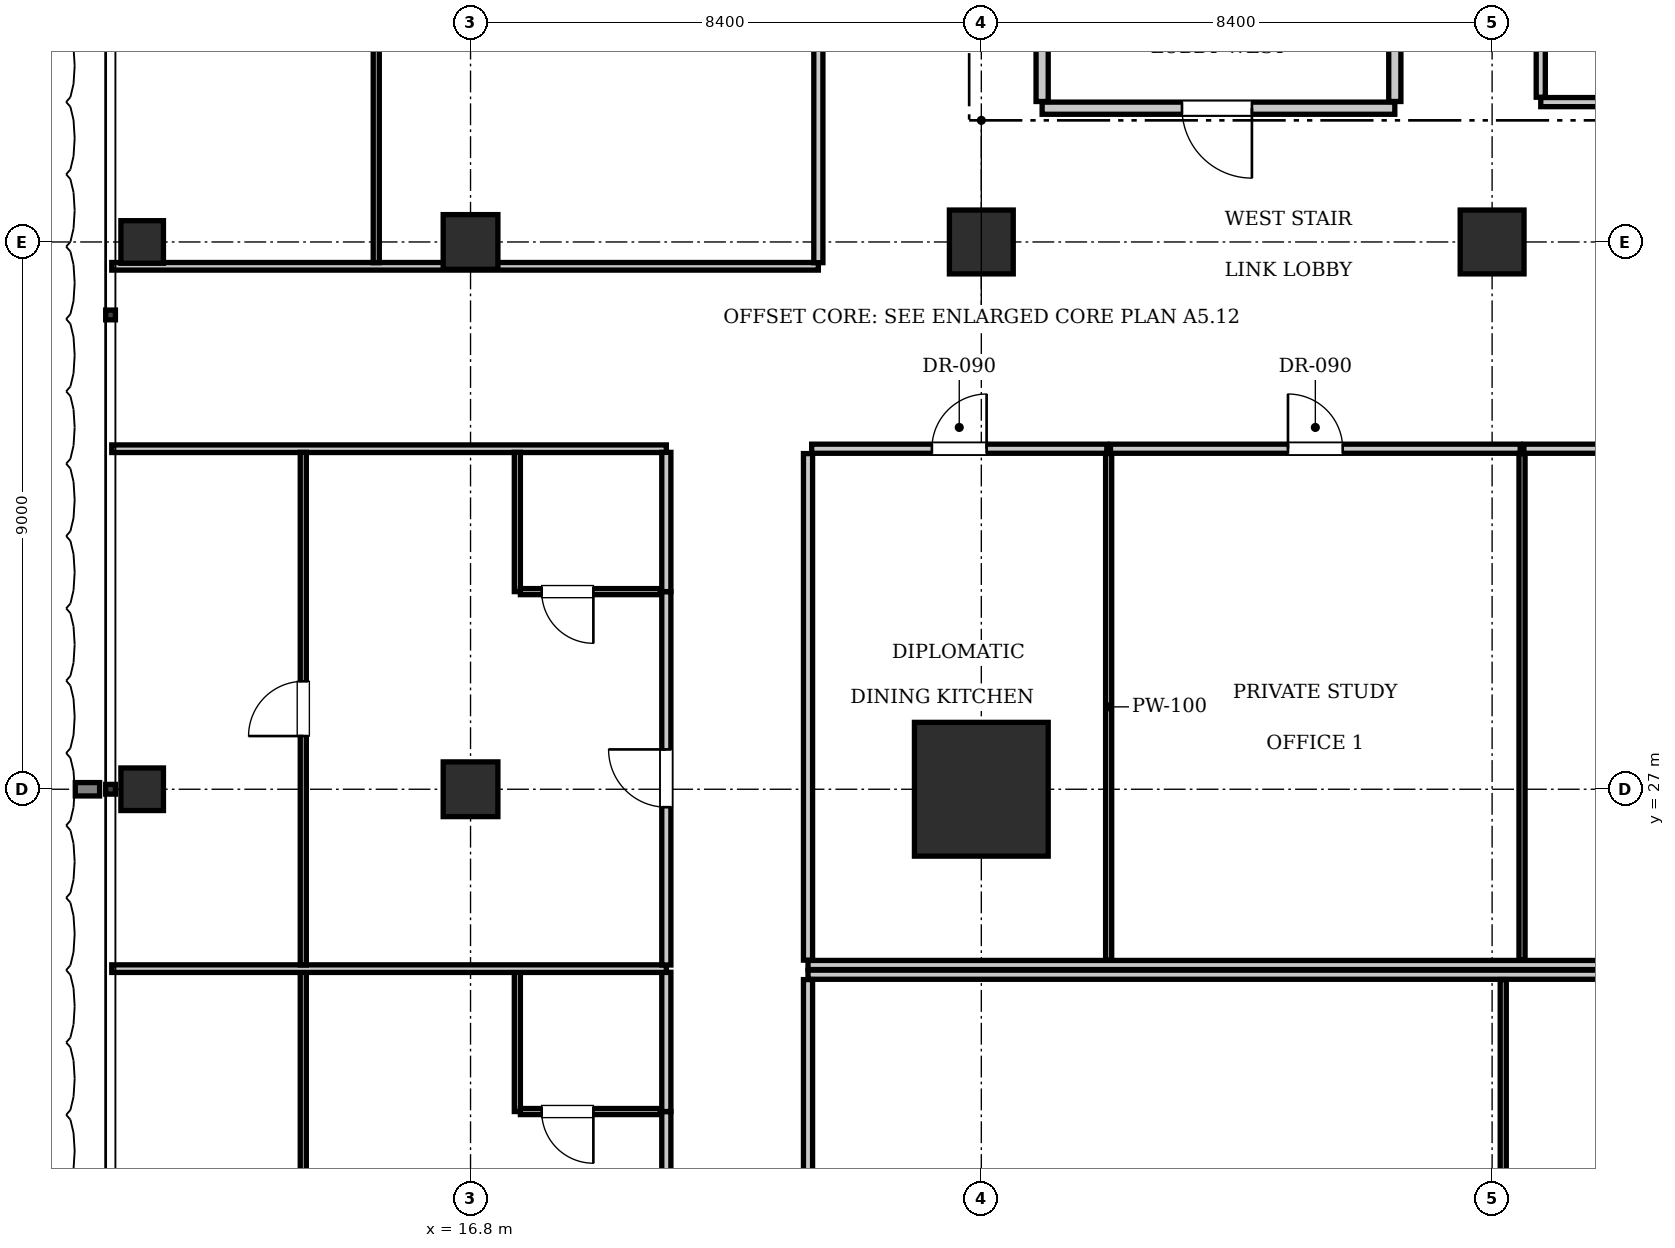
"""IFC4 building model, lengths in metres.
Left out: names, types, materials, properties, quantities, classifications, styles, units other than length and angle.
Written with IfcOpenShell. Run it as: python <this file> out.ifc"""

import sys

from ifc_helpers import new_model, si_unit, direction, frame, frame_2d, origin, origin_2d, place, context, subcontext, project, spatial, rectangle, i_section, extrude, element, fill, save


model = new_model("IFC4")
c1 = context("Model", 3, precision=1e-05, world=origin(), true_north=direction((0.0, 1.0)))
c2 = subcontext(c1, "Body", "Model", "MODEL_VIEW")
j1 = project(units=[si_unit("LENGTHUNIT", "METRE"), si_unit("PLANEANGLEUNIT", "RADIAN")], contexts=[c1])
p1 = place(None, origin())
s1 = spatial("IfcSite", under=j1, at=p1, CompositionType="ELEMENT")
p2 = place(p1, origin())
s2 = spatial("IfcBuilding", under=s1, at=p2, CompositionType="ELEMENT")
p3 = place(p2, frame((0.0, 0.0, 65.45)))
s3 = spatial("IfcBuildingStorey", under=s2, at=p3, CompositionType="ELEMENT", Elevation=65.45)
p4 = place(p3, frame((25.2, 27.0, 0.0), z_axis=(0.0, 0.0, 1.0), x_axis=(1.0, 0.0, 0.0)))
e1 = element("IfcColumn", 1, at=p4, inside=s3, PredefinedType="COLUMN", context=c2, shape_type="SweptSolid", body=[
    extrude(rectangle(XDim=2.2, YDim=2.2, at=origin_2d()), origin(), (0.0, 0.0, 1.0), 3.85),
])
for number, where, z_axis, x_axis in (
    (2, (25.2, 36.0, 0.0), (0.0, 0.0, 1.0), (1.0, 0.0, 0.0)),
    (3, (33.6, 36.0, 0.0), (0.0, 0.0, 1.0), (1.0, 0.0, 0.0)),
):
    element("IfcColumn", number, at=place(p3, frame(where, z_axis=z_axis, x_axis=x_axis)), inside=s3, PredefinedType="COLUMN", context=c2, shape_type="SweptSolid", body=[
        extrude(rectangle(XDim=1.05, YDim=1.05, at=origin_2d()), origin(), (0.0, 0.0, 1.0), 3.85),
    ])
for number, where, z_axis, x_axis in (
    (4, (16.8, 27.0, 0.0), (0.0, 0.0, 1.0), (1.0, 0.0, 0.0)),
    (5, (16.8, 36.0, 0.0), (0.0, 0.0, 1.0), (1.0, 0.0, 0.0)),
):
    element("IfcColumn", number, at=place(p3, frame(where, z_axis=z_axis, x_axis=x_axis)), inside=s3, PredefinedType="COLUMN", context=c2, shape_type="SweptSolid", body=[
        extrude(rectangle(XDim=0.9, YDim=0.9, at=origin_2d()), origin(), (0.0, 0.0, 1.0), 3.85),
    ])
for number, where, z_axis, x_axis in (
    (6, (11.4, 27.0, 0.0), (0.0, 0.0, 1.0), (1.0, 0.0, 0.0)),
    (7, (11.4, 36.0, 0.0), (0.0, 0.0, 1.0), (1.0, 0.0, 0.0)),
):
    element("IfcColumn", number, at=place(p3, frame(where, z_axis=z_axis, x_axis=x_axis)), inside=s3, PredefinedType="COLUMN", context=c2, shape_type="SweptSolid", body=[
        extrude(i_section(OverallWidth=0.7, OverallDepth=0.7, WebThickness=0.028, FlangeThickness=0.044, at=origin_2d()), origin(), (0.0, 0.0, 1.0), 3.85),
    ])
p5 = place(p3, frame((26.2, 38.2, 0.0), z_axis=(0.0, 0.0, 1.0), x_axis=(1.0, 0.0, 0.0)))
e8 = element("IfcWall", 8, at=p5, inside=s3, PredefinedType="PARTITIONING", context=c2, shape_type="SweptSolid", body=[
    extrude(rectangle(XDim=5.8, YDim=0.2, at=frame_2d((2.9, 0.0))), origin(), (0.0, 0.0, 1.0), 3.61),
])
p6 = place(p5, frame((2.3, 0.0, 0.0)))
e9 = element("IfcOpeningElement", 9, at=p6, cuts=e8, PredefinedType="OPENING", context=c2, shape_type="SweptSolid", body=[
    extrude(rectangle(XDim=1.15, YDim=2.15, at=frame_2d((0.575, 1.075))), frame((0.0, 0.11, 0.0), z_axis=(0.0, -1.0, 0.0), x_axis=(1.0, 0.0, 0.0)), (0.0, 0.0, 1.0), 0.22),
])
for number, where, z_axis, x_axis in (
    (10, (26.2, 38.31, 0.0), (0.0, 0.0, 1.0), (0.0, 1.0, 0.0)),
    (11, (32.0, 38.31, 0.0), (0.0, 0.0, 1.0), (0.0, 1.0, 0.0)),
):
    element("IfcWall", number, at=place(p3, frame(where, z_axis=z_axis, x_axis=x_axis)), inside=s3, PredefinedType="PARTITIONING", context=c2, shape_type="SweptSolid", body=[
        extrude(rectangle(XDim=3.07, YDim=0.2, at=frame_2d((1.535, 0.0))), origin(), (0.0, 0.0, 1.0), 3.61),
    ])
p7 = place(p3, frame((34.4, 38.3, 0.0), z_axis=(0.0, 0.0, 1.0), x_axis=(1.0, 0.0, 0.0)))
e12 = element("IfcWall", 12, at=p7, inside=s3, PredefinedType="PARTITIONING", context=c2, shape_type="SweptSolid", body=[
    extrude(rectangle(XDim=5.92, YDim=0.15, at=frame_2d((2.96, 0.0))), origin(), (0.0, 0.0, 1.0), 3.61),
])
p8 = place(p7, frame((2.4, 0.0, 0.0)))
e13 = element("IfcOpeningElement", 13, at=p8, cuts=e12, PredefinedType="OPENING", context=c2, shape_type="SweptSolid", body=[
    extrude(rectangle(XDim=0.9, YDim=2.1, at=frame_2d((0.45, 1.05))), frame((0.0, 0.085, 0.0), z_axis=(0.0, -1.0, 0.0), x_axis=(1.0, 0.0, 0.0)), (0.0, 0.0, 1.0), 0.17),
])
p9 = place(p3, frame((34.4, 38.38, 0.0), z_axis=(0.0, 0.0, 1.0), x_axis=(0.0, 1.0, 0.0)))
e14 = element("IfcWall", 14, at=p9, inside=s3, PredefinedType="PARTITIONING", context=c2, shape_type="SweptSolid", body=[
    extrude(rectangle(XDim=2.84, YDim=0.15, at=frame_2d((1.42, 0.0))), origin(), (0.0, 0.0, 1.0), 3.61),
])
p10 = place(p3, frame((22.35, 24.11, 0.0), z_axis=(0.0, 0.0, 1.0), x_axis=(1.0, 0.0, 0.0)))
e15 = element("IfcWall", 15, at=p10, inside=s3, PredefinedType="PARTITIONING", context=c2, shape_type="SweptSolid", body=[
    extrude(rectangle(XDim=30.9, YDim=0.15, at=frame_2d((15.45, 0.0))), origin(), (0.0, 0.0, 1.0), 3.61),
])
p11 = place(p3, frame((22.35, 24.19, 0.0), z_axis=(0.0, 0.0, 1.0), x_axis=(0.0, 1.0, 0.0)))
e16 = element("IfcWall", 16, at=p11, inside=s3, PredefinedType="PARTITIONING", context=c2, shape_type="SweptSolid", body=[
    extrude(rectangle(XDim=8.33, YDim=0.15, at=frame_2d((4.165, 0.0))), origin(), (0.0, 0.0, 1.0), 3.61),
])
p12 = place(p3, frame((22.41, 32.6, 0.0), z_axis=(0.0, 0.0, 1.0), x_axis=(1.0, 0.0, 0.0)))
e17 = element("IfcWall", 17, at=p12, inside=s3, PredefinedType="PARTITIONING", context=c2, shape_type="SweptSolid", body=[
    extrude(rectangle(XDim=4.854, YDim=0.15, at=frame_2d((2.427, 0.0))), origin(), (0.0, 0.0, 1.0), 3.61),
])
p13 = place(p12, frame((1.977, 0.0, 0.0)))
e18 = element("IfcOpeningElement", 18, at=p13, cuts=e17, PredefinedType="OPENING", context=c2, shape_type="SweptSolid", body=[
    extrude(rectangle(XDim=0.9, YDim=2.1, at=frame_2d((0.45, 1.05))), frame((0.0, 0.085, 0.0), z_axis=(0.0, -1.0, 0.0), x_axis=(1.0, 0.0, 0.0)), (0.0, 0.0, 1.0), 0.17),
])
p14 = place(p3, frame((27.294, 24.19, 0.0), z_axis=(0.0, 0.0, 1.0), x_axis=(0.0, 1.0, 0.0)))
e19 = element("IfcWall", 19, at=p14, inside=s3, PredefinedType="PARTITIONING", context=c2, shape_type="SweptSolid", body=[
    extrude(rectangle(XDim=8.33, YDim=0.1, at=frame_2d((4.165, 0.0))), origin(), (0.0, 0.0, 1.0), 3.61),
])
p15 = place(p3, frame((27.324, 32.6, 0.0), z_axis=(0.0, 0.0, 1.0), x_axis=(1.0, 0.0, 0.0)))
e20 = element("IfcWall", 20, at=p15, inside=s3, PredefinedType="PARTITIONING", context=c2, shape_type="SweptSolid", body=[
    extrude(rectangle(XDim=6.738, YDim=0.15, at=frame_2d((3.369, 0.0))), origin(), (0.0, 0.0, 1.0), 3.61),
])
p16 = place(p15, frame((2.919, 0.0, 0.0)))
e21 = element("IfcOpeningElement", 21, at=p16, cuts=e20, PredefinedType="OPENING", context=c2, shape_type="SweptSolid", body=[
    extrude(rectangle(XDim=0.9, YDim=2.1, at=frame_2d((0.45, 1.05))), frame((0.0, 0.085, 0.0), z_axis=(0.0, -1.0, 0.0), x_axis=(1.0, 0.0, 0.0)), (0.0, 0.0, 1.0), 0.17),
])
p17 = place(p3, frame((34.092, 24.19, 0.0), z_axis=(0.0, 0.0, 1.0), x_axis=(0.0, 1.0, 0.0)))
e22 = element("IfcWall", 22, at=p17, inside=s3, PredefinedType="PARTITIONING", context=c2, shape_type="SweptSolid", body=[
    extrude(rectangle(XDim=8.33, YDim=0.1, at=frame_2d((4.165, 0.0))), origin(), (0.0, 0.0, 1.0), 3.61),
])
p18 = place(p3, frame((34.122, 32.6, 0.0), z_axis=(0.0, 0.0, 1.0), x_axis=(1.0, 0.0, 0.0)))
e23 = element("IfcWall", 23, at=p18, inside=s3, PredefinedType="PARTITIONING", context=c2, shape_type="SweptSolid", body=[
    extrude(rectangle(XDim=8.592, YDim=0.15, at=frame_2d((4.296, 0.0))), origin(), (0.0, 0.0, 1.0), 3.61),
])
p19 = place(p18, frame((3.846, 0.0, 0.0)))
e24 = element("IfcOpeningElement", 24, at=p19, cuts=e23, PredefinedType="OPENING", context=c2, shape_type="SweptSolid", body=[
    extrude(rectangle(XDim=0.9, YDim=2.1, at=frame_2d((0.45, 1.05))), frame((0.0, 0.085, 0.0), z_axis=(0.0, -1.0, 0.0), x_axis=(1.0, 0.0, 0.0)), (0.0, 0.0, 1.0), 0.17),
])
p20 = place(p3, frame((22.35, 23.95, 0.0), z_axis=(0.0, 0.0, 1.0), x_axis=(1.0, 0.0, 0.0)))
e25 = element("IfcWall", 25, at=p20, inside=s3, PredefinedType="PARTITIONING", context=c2, shape_type="SweptSolid", body=[
    extrude(rectangle(XDim=30.9, YDim=0.15, at=frame_2d((15.45, 0.0))), origin(), (0.0, 0.0, 1.0), 3.61),
])
p21 = place(p3, frame((22.35, 15.53, 0.0), z_axis=(0.0, 0.0, 1.0), x_axis=(0.0, 1.0, 0.0)))
e26 = element("IfcWall", 26, at=p21, inside=s3, PredefinedType="PARTITIONING", context=c2, shape_type="SweptSolid", body=[
    extrude(rectangle(XDim=8.34, YDim=0.15, at=frame_2d((4.17, 0.0))), origin(), (0.0, 0.0, 1.0), 3.61),
])
p22 = place(p3, frame((33.783, 15.53, 0.0), z_axis=(0.0, 0.0, 1.0), x_axis=(0.0, 1.0, 0.0)))
e27 = element("IfcWall", 27, at=p22, inside=s3, PredefinedType="PARTITIONING", context=c2, shape_type="SweptSolid", body=[
    extrude(rectangle(XDim=8.34, YDim=0.1, at=frame_2d((4.17, 0.0))), origin(), (0.0, 0.0, 1.0), 2.988),
])
p23 = place(p3, frame((10.9, 32.6, 0.0), z_axis=(0.0, 0.0, 1.0), x_axis=(1.0, 0.0, 0.0)))
e28 = element("IfcWall", 28, at=p23, inside=s3, PredefinedType="PARTITIONING", context=c2, shape_type="SweptSolid", body=[
    extrude(rectangle(XDim=9.12, YDim=0.125, at=frame_2d((4.56, 0.0))), origin(), (0.0, 0.0, 1.0), 3.61),
])
p24 = place(p3, frame((20.02, 15.56, 0.0), z_axis=(0.0, 0.0, 1.0), x_axis=(0.0, 1.0, 0.0)))
e29 = element("IfcWall", 29, at=p24, inside=s3, PredefinedType="PARTITIONING", context=c2, shape_type="SweptSolid", body=[
    extrude(rectangle(XDim=6.14, YDim=0.15, at=frame_2d((3.07, 0.0))), origin(), (0.0, 0.0, 1.0), 3.61),
])
p25 = place(p24, frame((2.595, 0.0, 0.0)))
e30 = element("IfcOpeningElement", 30, at=p25, cuts=e29, PredefinedType="OPENING", context=c2, shape_type="SweptSolid", body=[
    extrude(rectangle(XDim=0.95, YDim=2.15, at=frame_2d((0.475, 1.075))), frame((0.0, 0.085, 0.0), z_axis=(0.0, -1.0, 0.0), x_axis=(1.0, 0.0, 0.0)), (0.0, 0.0, 1.0), 0.17),
])
p26 = place(p3, frame((20.02, 21.7, 0.0), z_axis=(0.0, 0.0, 1.0), x_axis=(0.0, 1.0, 0.0)))
e31 = element("IfcWall", 31, at=p26, inside=s3, PredefinedType="PARTITIONING", context=c2, shape_type="SweptSolid", body=[
    extrude(rectangle(XDim=2.29, YDim=0.15, at=frame_2d((1.145, 0.0))), origin(), (0.0, 0.0, 1.0), 3.61),
])
p27 = place(p3, frame((17.57, 21.7, 0.0), z_axis=(0.0, 0.0, 1.0), x_axis=(0.0, 1.0, 0.0)))
e32 = element("IfcWall", 32, at=p27, inside=s3, PredefinedType="PARTITIONING", context=c2, shape_type="SweptSolid", body=[
    extrude(rectangle(XDim=2.29, YDim=0.1, at=frame_2d((1.145, 0.0))), origin(), (0.0, 0.0, 1.0), 3.61),
])
p28 = place(p3, frame((17.62, 21.7, 0.0), z_axis=(0.0, 0.0, 1.0), x_axis=(1.0, 0.0, 0.0)))
e33 = element("IfcWall", 33, at=p28, inside=s3, PredefinedType="PARTITIONING", context=c2, shape_type="SweptSolid", body=[
    extrude(rectangle(XDim=2.3, YDim=0.1, at=frame_2d((1.15, 0.0))), origin(), (0.0, 0.0, 1.0), 3.61),
])
p29 = place(p28, frame((0.35, 0.0, 0.0)))
e34 = element("IfcOpeningElement", 34, at=p29, cuts=e33, PredefinedType="OPENING", context=c2, shape_type="SweptSolid", body=[
    extrude(rectangle(XDim=0.85, YDim=2.1, at=frame_2d((0.425, 1.05))), frame((0.0, 0.06, 0.0), z_axis=(0.0, -1.0, 0.0), x_axis=(1.0, 0.0, 0.0)), (0.0, 0.0, 1.0), 0.12),
])
p30 = place(p3, frame((14.05, 15.56, 0.0), z_axis=(0.0, 0.0, 1.0), x_axis=(0.0, 1.0, 0.0)))
e35 = element("IfcWall", 35, at=p30, inside=s3, PredefinedType="PARTITIONING", context=c2, shape_type="SweptSolid", body=[
    extrude(rectangle(XDim=8.43, YDim=0.1, at=frame_2d((4.215, 0.0))), origin(), (0.0, 0.0, 1.0), 3.352),
])
p31 = place(p30, frame((3.765, 0.0, 0.0)))
e36 = element("IfcOpeningElement", 36, at=p31, cuts=e35, PredefinedType="OPENING", context=c2, shape_type="SweptSolid", body=[
    extrude(rectangle(XDim=0.9, YDim=2.1, at=frame_2d((0.45, 1.05))), frame((0.0, 0.06, 0.0), z_axis=(0.0, -1.0, 0.0), x_axis=(1.0, 0.0, 0.0)), (0.0, 0.0, 1.0), 0.12),
])
p32 = place(p3, frame((10.9, 24.05, 0.0), z_axis=(0.0, 0.0, 1.0), x_axis=(1.0, 0.0, 0.0)))
e37 = element("IfcWall", 37, at=p32, inside=s3, PredefinedType="PARTITIONING", context=c2, shape_type="SweptSolid", body=[
    extrude(rectangle(XDim=9.12, YDim=0.125, at=frame_2d((4.56, 0.0))), origin(), (0.0, 0.0, 1.0), 3.61),
])
p33 = place(p3, frame((20.02, 24.11, 0.0), z_axis=(0.0, 0.0, 1.0), x_axis=(0.0, 1.0, 0.0)))
e38 = element("IfcWall", 38, at=p33, inside=s3, PredefinedType="PARTITIONING", context=c2, shape_type="SweptSolid", body=[
    extrude(rectangle(XDim=6.14, YDim=0.15, at=frame_2d((3.07, 0.0))), origin(), (0.0, 0.0, 1.0), 3.61),
])
p34 = place(p33, frame((2.595, 0.0, 0.0)))
e39 = element("IfcOpeningElement", 39, at=p34, cuts=e38, PredefinedType="OPENING", context=c2, shape_type="SweptSolid", body=[
    extrude(rectangle(XDim=0.95, YDim=2.15, at=frame_2d((0.475, 1.075))), frame((0.0, 0.085, 0.0), z_axis=(0.0, -1.0, 0.0), x_axis=(1.0, 0.0, 0.0)), (0.0, 0.0, 1.0), 0.17),
])
p35 = place(p3, frame((20.02, 30.25, 0.0), z_axis=(0.0, 0.0, 1.0), x_axis=(0.0, 1.0, 0.0)))
e40 = element("IfcWall", 40, at=p35, inside=s3, PredefinedType="PARTITIONING", context=c2, shape_type="SweptSolid", body=[
    extrude(rectangle(XDim=2.29, YDim=0.15, at=frame_2d((1.145, 0.0))), origin(), (0.0, 0.0, 1.0), 3.61),
])
p36 = place(p3, frame((17.57, 30.25, 0.0), z_axis=(0.0, 0.0, 1.0), x_axis=(0.0, 1.0, 0.0)))
e41 = element("IfcWall", 41, at=p36, inside=s3, PredefinedType="PARTITIONING", context=c2, shape_type="SweptSolid", body=[
    extrude(rectangle(XDim=2.29, YDim=0.1, at=frame_2d((1.145, 0.0))), origin(), (0.0, 0.0, 1.0), 3.61),
])
p37 = place(p3, frame((17.62, 30.25, 0.0), z_axis=(0.0, 0.0, 1.0), x_axis=(1.0, 0.0, 0.0)))
e42 = element("IfcWall", 42, at=p37, inside=s3, PredefinedType="PARTITIONING", context=c2, shape_type="SweptSolid", body=[
    extrude(rectangle(XDim=2.3, YDim=0.1, at=frame_2d((1.15, 0.0))), origin(), (0.0, 0.0, 1.0), 3.61),
])
p38 = place(p37, frame((0.35, 0.0, 0.0)))
e43 = element("IfcOpeningElement", 43, at=p38, cuts=e42, PredefinedType="OPENING", context=c2, shape_type="SweptSolid", body=[
    extrude(rectangle(XDim=0.85, YDim=2.1, at=frame_2d((0.425, 1.05))), frame((0.0, 0.06, 0.0), z_axis=(0.0, -1.0, 0.0), x_axis=(1.0, 0.0, 0.0)), (0.0, 0.0, 1.0), 0.12),
])
p39 = place(p3, frame((14.05, 24.11, 0.0), z_axis=(0.0, 0.0, 1.0), x_axis=(0.0, 1.0, 0.0)))
e44 = element("IfcWall", 44, at=p39, inside=s3, PredefinedType="PARTITIONING", context=c2, shape_type="SweptSolid", body=[
    extrude(rectangle(XDim=8.43, YDim=0.1, at=frame_2d((4.215, 0.0))), origin(), (0.0, 0.0, 1.0), 3.403),
])
p40 = place(p39, frame((3.765, 0.0, 0.0)))
e45 = element("IfcOpeningElement", 45, at=p40, cuts=e44, PredefinedType="OPENING", context=c2, shape_type="SweptSolid", body=[
    extrude(rectangle(XDim=0.9, YDim=2.1, at=frame_2d((0.45, 1.05))), frame((0.0, 0.06, 0.0), z_axis=(0.0, -1.0, 0.0), x_axis=(1.0, 0.0, 0.0)), (0.0, 0.0, 1.0), 0.12),
])
p41 = place(p3, frame((10.9, 35.6, 0.0), z_axis=(0.0, 0.0, 1.0), x_axis=(1.0, 0.0, 0.0)))
e46 = element("IfcWall", 46, at=p41, inside=s3, PredefinedType="PARTITIONING", context=c2, shape_type="SweptSolid", body=[
    extrude(rectangle(XDim=11.62, YDim=0.125, at=frame_2d((5.81, 0.0))), origin(), (0.0, 0.0, 1.0), 3.61),
])
p42 = place(p3, frame((22.52, 35.66, 0.0), z_axis=(0.0, 0.0, 1.0), x_axis=(0.0, 1.0, 0.0)))
e47 = element("IfcWall", 47, at=p42, inside=s3, PredefinedType="PARTITIONING", context=c2, shape_type="SweptSolid", body=[
    extrude(rectangle(XDim=12.328, YDim=0.15, at=frame_2d((6.164, 0.0))), origin(), (0.0, 0.0, 1.0), 3.61),
])
p43 = place(p42, frame((5.689, 0.0, 0.0)))
e48 = element("IfcOpeningElement", 48, at=p43, cuts=e47, PredefinedType="OPENING", context=c2, shape_type="SweptSolid", body=[
    extrude(rectangle(XDim=0.95, YDim=2.15, at=frame_2d((0.475, 1.075))), frame((0.0, 0.085, 0.0), z_axis=(0.0, -1.0, 0.0), x_axis=(1.0, 0.0, 0.0)), (0.0, 0.0, 1.0), 0.17),
])
p44 = place(p3, frame((15.25, 35.66, 0.0), z_axis=(0.0, 0.0, 1.0), x_axis=(0.0, 1.0, 0.0)))
e49 = element("IfcWall", 49, at=p44, inside=s3, PredefinedType="PARTITIONING", context=c2, shape_type="SweptSolid", body=[
    extrude(rectangle(XDim=14.618, YDim=0.1, at=frame_2d((7.309, 0.0))), origin(), (0.0, 0.0, 1.0), 3.61),
])
p45 = place(p44, frame((6.859, 0.0, 0.0)))
e50 = element("IfcOpeningElement", 50, at=p45, cuts=e49, PredefinedType="OPENING", context=c2, shape_type="SweptSolid", body=[
    extrude(rectangle(XDim=0.9, YDim=2.1, at=frame_2d((0.45, 1.05))), frame((0.0, 0.06, 0.0), z_axis=(0.0, -1.0, 0.0), x_axis=(1.0, 0.0, 0.0)), (0.0, 0.0, 1.0), 0.12),
])
p46 = place(p6, frame((1.15, 0.0, 0.0), z_axis=(0.0, 0.0, 1.0), x_axis=(-1.0, 0.0, 0.0)))
e51 = element("IfcDoor", 51, at=p46, inside=s3, OperationType="SINGLE_SWING_LEFT", PredefinedType="DOOR", context=c2, shape_type="SweptSolid", body=[
    extrude(rectangle(XDim=1.15, YDim=2.15, at=frame_2d((0.575, 1.075))), frame((0.0, 0.025, 0.0), z_axis=(0.0, -1.0, 0.0), x_axis=(1.0, 0.0, 0.0)), (0.0, 0.0, 1.0), 0.05),
])
fill(e9, e51)
p47 = place(p13, origin())
e52 = element("IfcDoor", 52, at=p47, inside=s3, OperationType="SINGLE_SWING_RIGHT", PredefinedType="DOOR", context=c2, shape_type="SweptSolid", body=[
    extrude(rectangle(XDim=0.9, YDim=2.1, at=frame_2d((0.45, 1.05))), frame((0.0, 0.025, 0.0), z_axis=(0.0, -1.0, 0.0), x_axis=(1.0, 0.0, 0.0)), (0.0, 0.0, 1.0), 0.05),
])
fill(e18, e52)
p48 = place(p16, origin())
e53 = element("IfcDoor", 53, at=p48, inside=s3, OperationType="SINGLE_SWING_LEFT", PredefinedType="DOOR", context=c2, shape_type="SweptSolid", body=[
    extrude(rectangle(XDim=0.9, YDim=2.1, at=frame_2d((0.45, 1.05))), frame((0.0, 0.025, 0.0), z_axis=(0.0, -1.0, 0.0), x_axis=(1.0, 0.0, 0.0)), (0.0, 0.0, 1.0), 0.05),
])
fill(e21, e53)
p49 = place(p29, frame((0.85, 0.0, 0.0), z_axis=(0.0, 0.0, 1.0), x_axis=(-1.0, 0.0, 0.0)))
e54 = element("IfcDoor", 54, at=p49, inside=s3, OperationType="SINGLE_SWING_LEFT", PredefinedType="DOOR", context=c2, shape_type="SweptSolid", body=[
    extrude(rectangle(XDim=0.85, YDim=2.1, at=frame_2d((0.425, 1.05))), frame((0.0, 0.025, 0.0), z_axis=(0.0, -1.0, 0.0), x_axis=(1.0, 0.0, 0.0)), (0.0, 0.0, 1.0), 0.05),
])
fill(e34, e54)
p50 = place(p38, frame((0.85, 0.0, 0.0), z_axis=(0.0, 0.0, 1.0), x_axis=(-1.0, 0.0, 0.0)))
e55 = element("IfcDoor", 55, at=p50, inside=s3, OperationType="SINGLE_SWING_LEFT", PredefinedType="DOOR", context=c2, shape_type="SweptSolid", body=[
    extrude(rectangle(XDim=0.85, YDim=2.1, at=frame_2d((0.425, 1.05))), frame((0.0, 0.025, 0.0), z_axis=(0.0, -1.0, 0.0), x_axis=(1.0, 0.0, 0.0)), (0.0, 0.0, 1.0), 0.05),
])
fill(e43, e55)
p51 = place(p34, origin())
e56 = element("IfcDoor", 56, at=p51, inside=s3, OperationType="SINGLE_SWING_RIGHT", PredefinedType="DOOR", context=c2, shape_type="SweptSolid", body=[
    extrude(rectangle(XDim=0.95, YDim=2.15, at=frame_2d((0.475, 1.075))), frame((0.0, 0.025, 0.0), z_axis=(0.0, -1.0, 0.0), x_axis=(1.0, 0.0, 0.0)), (0.0, 0.0, 1.0), 0.05),
])
fill(e39, e56)
p52 = place(p40, origin())
e57 = element("IfcDoor", 57, at=p52, inside=s3, OperationType="SINGLE_SWING_LEFT", PredefinedType="DOOR", context=c2, shape_type="SweptSolid", body=[
    extrude(rectangle(XDim=0.9, YDim=2.1, at=frame_2d((0.45, 1.05))), frame((0.0, 0.025, 0.0), z_axis=(0.0, -1.0, 0.0), x_axis=(1.0, 0.0, 0.0)), (0.0, 0.0, 1.0), 0.05),
])
fill(e45, e57)
save(model, sys.argv[1])
